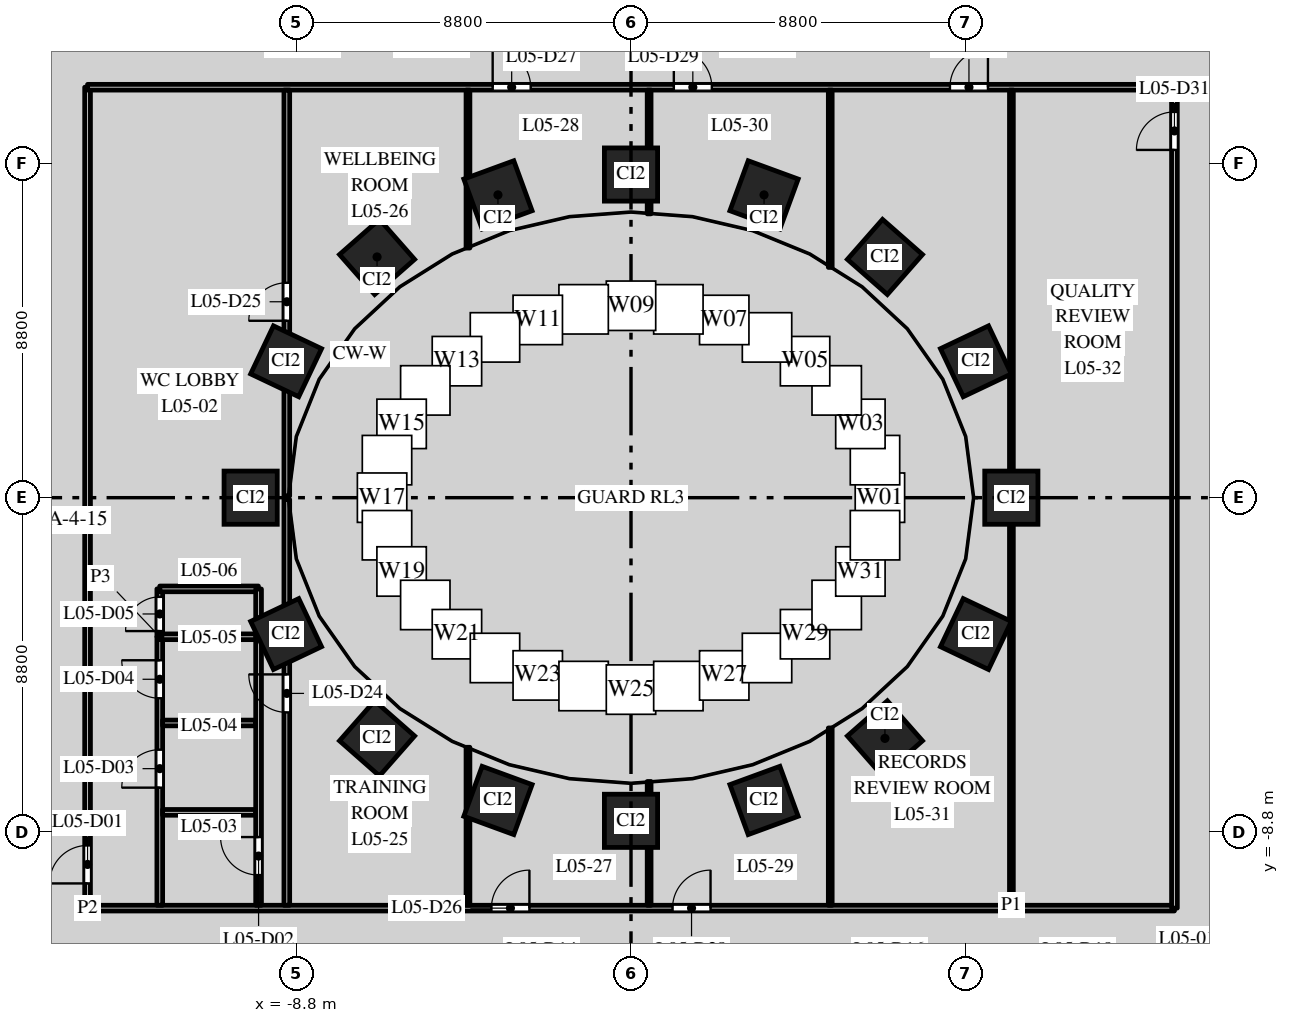
"""IFC4 building model, lengths in metres.
Left out: names, types, materials, properties, quantities, classifications, styles, units other than length and angle.
Written with IfcOpenShell. Run it as: python <this file> out.ifc"""

import sys

from ifc_helpers import new_model, si_unit, direction, frame, frame_2d, origin, origin_2d, place, context, subcontext, project, spatial, rectangle, extrude, element, fill, save


model = new_model("IFC4")
c1 = context("Model", 3, precision=1e-05, world=origin(), true_north=direction((0.0, 1.0)))
c2 = subcontext(c1, "Body", "Model", "MODEL_VIEW")
j1 = project(units=[si_unit("LENGTHUNIT", "METRE"), si_unit("PLANEANGLEUNIT", "RADIAN")], contexts=[c1])
p1 = place(None, origin())
s1 = spatial("IfcSite", under=j1, at=p1, CompositionType="ELEMENT")
p2 = place(p1, origin())
s2 = spatial("IfcBuilding", under=s1, at=p2, CompositionType="ELEMENT")
p3 = place(p2, frame((0.0, 0.0, 30.5)))
s3 = spatial("IfcBuildingStorey", under=s2, at=p3, CompositionType="ELEMENT", Elevation=30.5)
for number, where, z_axis, x_axis in (
    (1, (10.008, 0.0, 0.0), (0.0, 0.0, 1.0), (0.0, 1.0, 0.0)),
    (2, (9.076, 3.588, 0.0), (0.0, 0.0, 1.0), (-0.429, 0.903, 0.0)),
    (3, (6.682, 6.334, 0.0), (0.0, 0.0, 1.0), (-0.751, 0.66, 0.0)),
    (4, (3.501, 7.967, 0.0), (0.0, 0.0, 1.0), (-0.939, 0.344, 0.0)),
    (5, (0.0, 8.503, 0.0), (0.0, 0.0, 1.0), (-1.0, 0.0, 0.0)),
    (6, (-3.501, 7.967, 0.0), (0.0, 0.0, 1.0), (-0.939, -0.344, 0.0)),
    (7, (-6.682, 6.334, 0.0), (0.0, 0.0, 1.0), (-0.751, -0.66, 0.0)),
    (8, (-9.076, 3.588, 0.0), (0.0, 0.0, 1.0), (-0.429, -0.903, 0.0)),
    (9, (-10.008, 0.0, 0.0), (0.0, 0.0, 1.0), (0.0, -1.0, 0.0)),
    (10, (-9.076, -3.588, 0.0), (0.0, 0.0, 1.0), (0.429, -0.903, 0.0)),
    (11, (-6.682, -6.334, 0.0), (0.0, 0.0, 1.0), (0.751, -0.66, 0.0)),
    (12, (-3.501, -7.967, 0.0), (0.0, 0.0, 1.0), (0.939, -0.344, 0.0)),
    (13, (0.0, -8.503, 0.0), (0.0, 0.0, 1.0), (1.0, 0.0, 0.0)),
    (14, (3.501, -7.967, 0.0), (0.0, 0.0, 1.0), (0.939, 0.344, 0.0)),
    (15, (6.682, -6.334, 0.0), (0.0, 0.0, 1.0), (0.751, 0.66, 0.0)),
    (16, (9.076, -3.588, 0.0), (0.0, 0.0, 1.0), (0.429, 0.903, 0.0)),
):
    element("IfcColumn", number, at=place(p3, frame(where, z_axis=z_axis, x_axis=x_axis)), inside=s3, PredefinedType="COLUMN", context=c2, shape_type="SweptSolid", body=[
        extrude(rectangle(XDim=1.4, YDim=1.4, at=origin_2d()), origin(), (0.0, 0.0, 1.0), 4.0),
    ])
p4 = place(p3, frame((-14.3, -10.8, 0.0), z_axis=(0.0, 0.0, 1.0), x_axis=(0.0, 1.0, 0.0)))
e17 = element("IfcWall", 17, at=p4, inside=s3, PredefinedType="PARTITIONING", context=c2, shape_type="SweptSolid", body=[
    extrude(rectangle(XDim=21.6, YDim=0.15, at=frame_2d((10.8, 0.0))), origin(), (0.0, 0.0, 1.0), 2.75),
])
p5 = place(p4, frame((0.65, 0.0, 0.0)))
e18 = element("IfcOpeningElement", 18, at=p5, cuts=e17, PredefinedType="OPENING", context=c2, shape_type="SweptSolid", body=[
    extrude(rectangle(XDim=1.0, YDim=2.1, at=frame_2d((0.5, 1.05))), frame((0.0, 0.085, 0.0), z_axis=(0.0, -1.0, 0.0), x_axis=(1.0, 0.0, 0.0)), (0.0, 0.0, 1.0), 0.17),
])
p6 = place(p3, frame((-14.3, -10.8, 0.0), z_axis=(0.0, 0.0, 1.0), x_axis=(1.0, 0.0, 0.0)))
e19 = element("IfcWall", 19, at=p6, inside=s3, PredefinedType="PARTITIONING", context=c2, shape_type="SweptSolid", body=[
    extrude(rectangle(XDim=28.6, YDim=0.15, at=frame_2d((14.3, 0.0))), origin(), (0.0, 0.0, 1.0), 2.85),
])
p7 = place(p6, frame((10.627, 0.0, 0.0)))
e20 = element("IfcOpeningElement", 20, at=p7, cuts=e19, PredefinedType="OPENING", context=c2, shape_type="SweptSolid", body=[
    extrude(rectangle(XDim=1.0, YDim=2.1, at=frame_2d((0.5, 1.05))), frame((0.0, 0.085, 0.0), z_axis=(0.0, -1.0, 0.0), x_axis=(1.0, 0.0, 0.0)), (0.0, 0.0, 1.0), 0.17),
])
p8 = place(p6, frame((15.393, 0.0, 0.0)))
e21 = element("IfcOpeningElement", 21, at=p8, cuts=e19, PredefinedType="OPENING", context=c2, shape_type="SweptSolid", body=[
    extrude(rectangle(XDim=1.0, YDim=2.1, at=frame_2d((0.5, 1.05))), frame((0.0, 0.085, 0.0), z_axis=(0.0, -1.0, 0.0), x_axis=(1.0, 0.0, 0.0)), (0.0, 0.0, 1.0), 0.17),
])
p9 = place(p3, frame((-14.3, 10.8, 0.0), z_axis=(0.0, 0.0, 1.0), x_axis=(1.0, 0.0, 0.0)))
e22 = element("IfcWall", 22, at=p9, inside=s3, PredefinedType="PARTITIONING", context=c2, shape_type="SweptSolid", body=[
    extrude(rectangle(XDim=28.6, YDim=0.15, at=frame_2d((14.3, 0.0))), origin(), (0.0, 0.0, 1.0), 2.85),
])
p10 = place(p9, frame((10.66, 0.0, 0.0)))
e23 = element("IfcOpeningElement", 23, at=p10, cuts=e22, PredefinedType="OPENING", context=c2, shape_type="SweptSolid", body=[
    extrude(rectangle(XDim=1.0, YDim=2.1, at=frame_2d((0.5, 1.05))), frame((0.0, 0.085, 0.0), z_axis=(0.0, -1.0, 0.0), x_axis=(1.0, 0.0, 0.0)), (0.0, 0.0, 1.0), 0.17),
])
p11 = place(p9, frame((15.427, 0.0, 0.0)))
e24 = element("IfcOpeningElement", 24, at=p11, cuts=e22, PredefinedType="OPENING", context=c2, shape_type="SweptSolid", body=[
    extrude(rectangle(XDim=1.0, YDim=2.1, at=frame_2d((0.5, 1.05))), frame((0.0, 0.085, 0.0), z_axis=(0.0, -1.0, 0.0), x_axis=(1.0, 0.0, 0.0)), (0.0, 0.0, 1.0), 0.17),
])
p12 = place(p9, frame((22.693, 0.0, 0.0)))
e25 = element("IfcOpeningElement", 25, at=p12, cuts=e22, PredefinedType="OPENING", context=c2, shape_type="SweptSolid", body=[
    extrude(rectangle(XDim=1.0, YDim=2.1, at=frame_2d((0.5, 1.05))), frame((0.0, 0.085, 0.0), z_axis=(0.0, -1.0, 0.0), x_axis=(1.0, 0.0, 0.0)), (0.0, 0.0, 1.0), 0.17),
])
p13 = place(p3, frame((-12.4, -10.725, 0.0), z_axis=(0.0, 0.0, 1.0), x_axis=(0.0, 1.0, 0.0)))
e26 = element("IfcWall", 26, at=p13, inside=s3, PredefinedType="PARTITIONING", context=c2, shape_type="SweptSolid", body=[
    extrude(rectangle(XDim=7.065, YDim=0.15, at=frame_2d((3.533, 0.0))), origin(), (0.0, 0.0, 1.0), 2.75),
])
p14 = place(p13, frame((3.095, 0.0, 0.0)))
e27 = element("IfcOpeningElement", 27, at=p14, cuts=e26, PredefinedType="OPENING", context=c2, shape_type="SweptSolid", body=[
    extrude(rectangle(XDim=1.0, YDim=2.1, at=frame_2d((0.5, 1.05))), frame((0.0, 0.085, 0.0), z_axis=(0.0, -1.0, 0.0), x_axis=(1.0, 0.0, 0.0)), (0.0, 0.0, 1.0), 0.17),
])
p15 = place(p13, frame((5.447, 0.0, 0.0)))
e28 = element("IfcOpeningElement", 28, at=p15, cuts=e26, PredefinedType="OPENING", context=c2, shape_type="SweptSolid", body=[
    extrude(rectangle(XDim=1.0, YDim=2.1, at=frame_2d((0.5, 1.05))), frame((0.0, 0.085, 0.0), z_axis=(0.0, -1.0, 0.0), x_axis=(1.0, 0.0, 0.0)), (0.0, 0.0, 1.0), 0.17),
])
p16 = place(p3, frame((-12.325, -8.28, 0.0), z_axis=(0.0, 0.0, 1.0), x_axis=(1.0, 0.0, 0.0)))
e29 = element("IfcWall", 29, at=p16, inside=s3, PredefinedType="PARTITIONING", context=c2, shape_type="SweptSolid", body=[
    extrude(rectangle(XDim=2.45, YDim=0.15, at=frame_2d((1.225, 0.0))), origin(), (0.0, 0.0, 1.0), 2.75),
])
p17 = place(p3, frame((-12.325, -5.928, 0.0), z_axis=(0.0, 0.0, 1.0), x_axis=(1.0, 0.0, 0.0)))
e30 = element("IfcWall", 30, at=p17, inside=s3, PredefinedType="PARTITIONING", context=c2, shape_type="SweptSolid", body=[
    extrude(rectangle(XDim=2.45, YDim=0.15, at=frame_2d((1.225, 0.0))), origin(), (0.0, 0.0, 1.0), 3.7),
])
p18 = place(p3, frame((-12.4, -3.66, 0.0), z_axis=(0.0, 0.0, 1.0), x_axis=(0.0, 1.0, 0.0)))
e31 = element("IfcWall", 31, at=p18, inside=s3, PredefinedType="PARTITIONING", context=c2, shape_type="SweptSolid", body=[
    extrude(rectangle(XDim=1.26, YDim=0.15, at=frame_2d((0.63, 0.0))), origin(), (0.0, 0.0, 1.0), 3.7),
])
p19 = place(p18, frame((0.15, 0.0, 0.0)))
e32 = element("IfcOpeningElement", 32, at=p19, cuts=e31, PredefinedType="OPENING", context=c2, shape_type="SweptSolid", body=[
    extrude(rectangle(XDim=0.9, YDim=2.1, at=frame_2d((0.45, 1.05))), frame((0.0, 0.085, 0.0), z_axis=(0.0, -1.0, 0.0), x_axis=(1.0, 0.0, 0.0)), (0.0, 0.0, 1.0), 0.17),
])
p20 = place(p3, frame((-12.4, -3.66, 0.0), z_axis=(0.0, 0.0, 1.0), x_axis=(1.0, 0.0, 0.0)))
e33 = element("IfcWall", 33, at=p20, inside=s3, PredefinedType="PARTITIONING", context=c2, shape_type="SweptSolid", body=[
    extrude(rectangle(XDim=2.6, YDim=0.15, at=frame_2d((1.3, 0.0))), origin(), (0.0, 0.0, 1.0), 3.7),
])
p21 = place(p3, frame((-12.4, -2.4, 0.0), z_axis=(0.0, 0.0, 1.0), x_axis=(1.0, 0.0, 0.0)))
e34 = element("IfcWall", 34, at=p21, inside=s3, PredefinedType="PARTITIONING", context=c2, shape_type="SweptSolid", body=[
    extrude(rectangle(XDim=2.596, YDim=0.15, at=frame_2d((1.298, 0.0))), origin(), (0.0, 0.0, 1.0), 3.7),
])
p22 = place(p3, frame((-9.8, -10.725, 0.0), z_axis=(0.0, 0.0, 1.0), x_axis=(0.0, 1.0, 0.0)))
e35 = element("IfcWall", 35, at=p22, inside=s3, PredefinedType="PARTITIONING", context=c2, shape_type="SweptSolid", body=[
    extrude(rectangle(XDim=7.065, YDim=0.15, at=frame_2d((3.533, 0.0))), origin(), (0.0, 0.0, 1.0), 2.75),
])
p23 = place(p22, frame((0.795, 0.0, 0.0)))
e36 = element("IfcOpeningElement", 36, at=p23, cuts=e35, PredefinedType="OPENING", context=c2, shape_type="SweptSolid", body=[
    extrude(rectangle(XDim=1.0, YDim=2.1, at=frame_2d((0.5, 1.05))), frame((0.0, 0.085, 0.0), z_axis=(0.0, -1.0, 0.0), x_axis=(1.0, 0.0, 0.0)), (0.0, 0.0, 1.0), 0.17),
])
p24 = place(p3, frame((-9.8, -3.66, 0.0), z_axis=(0.0, 0.0, 1.0), x_axis=(0.0, 1.0, 0.0)))
e37 = element("IfcWall", 37, at=p24, inside=s3, PredefinedType="PARTITIONING", context=c2, shape_type="SweptSolid", body=[
    extrude(rectangle(XDim=1.256, YDim=0.15, at=frame_2d((0.628, 0.0))), origin(), (0.0, 0.0, 1.0), 3.7),
])
p25 = place(p3, frame((-9.057, -10.725, 0.0), z_axis=(0.0, 0.0, 1.0), x_axis=(0.0, 1.0, 0.0)))
e38 = element("IfcWall", 38, at=p25, inside=s3, PredefinedType="PARTITIONING", context=c2, shape_type="SweptSolid", body=[
    extrude(rectangle(XDim=10.68, YDim=0.15, at=frame_2d((5.34, 0.0))), origin(), (0.0, 0.0, 1.0), 2.75),
])
p26 = place(p25, frame((5.075, 0.0, 0.0)))
e39 = element("IfcOpeningElement", 39, at=p26, cuts=e38, PredefinedType="OPENING", context=c2, shape_type="SweptSolid", body=[
    extrude(rectangle(XDim=1.0, YDim=2.1, at=frame_2d((0.5, 1.05))), frame((0.0, 0.085, 0.0), z_axis=(0.0, -1.0, 0.0), x_axis=(1.0, 0.0, 0.0)), (0.0, 0.0, 1.0), 0.17),
])
p27 = place(p3, frame((-9.057, 0.045, 0.0), z_axis=(0.0, 0.0, 1.0), x_axis=(0.0, 1.0, 0.0)))
e40 = element("IfcWall", 40, at=p27, inside=s3, PredefinedType="PARTITIONING", context=c2, shape_type="SweptSolid", body=[
    extrude(rectangle(XDim=10.68, YDim=0.15, at=frame_2d((5.34, 0.0))), origin(), (0.0, 0.0, 1.0), 2.75),
])
p28 = place(p27, frame((4.61, 0.0, 0.0)))
e41 = element("IfcOpeningElement", 41, at=p28, cuts=e40, PredefinedType="OPENING", context=c2, shape_type="SweptSolid", body=[
    extrude(rectangle(XDim=1.0, YDim=2.1, at=frame_2d((0.5, 1.05))), frame((0.0, 0.085, 0.0), z_axis=(0.0, -1.0, 0.0), x_axis=(1.0, 0.0, 0.0)), (0.0, 0.0, 1.0), 0.17),
])
for number, where, z_axis, x_axis in (
    (42, (-4.29, -10.725, 0.0), (0.0, 0.0, 1.0), (0.0, 1.0, 0.0)),
    (43, (-4.29, 6.568, 0.0), (0.0, 0.0, 1.0), (0.0, 1.0, 0.0)),
):
    element("IfcWall", number, at=place(p3, frame(where, z_axis=z_axis, x_axis=x_axis)), inside=s3, PredefinedType="PARTITIONING", context=c2, shape_type="SweptSolid", body=[
        extrude(rectangle(XDim=4.157, YDim=0.1, at=frame_2d((2.079, 0.0))), origin(), (0.0, 0.0, 1.0), 2.85),
    ])
for number, where, z_axis, x_axis in (
    (44, (0.477, -10.725, 0.0), (0.0, 0.0, 1.0), (0.0, 1.0, 0.0)),
    (45, (0.477, 7.468, 0.0), (0.0, 0.0, 1.0), (0.0, 1.0, 0.0)),
):
    element("IfcWall", number, at=place(p3, frame(where, z_axis=z_axis, x_axis=x_axis)), inside=s3, PredefinedType="PARTITIONING", context=c2, shape_type="SweptSolid", body=[
        extrude(rectangle(XDim=3.257, YDim=0.1, at=frame_2d((1.628, 0.0))), origin(), (0.0, 0.0, 1.0), 2.85),
    ])
for number, where, z_axis, x_axis in (
    (46, (5.243, -10.725, 0.0), (0.0, 0.0, 1.0), (0.0, 1.0, 0.0)),
    (47, (5.243, 6.059, 0.0), (0.0, 0.0, 1.0), (0.0, 1.0, 0.0)),
):
    element("IfcWall", number, at=place(p3, frame(where, z_axis=z_axis, x_axis=x_axis)), inside=s3, PredefinedType="PARTITIONING", context=c2, shape_type="SweptSolid", body=[
        extrude(rectangle(XDim=4.666, YDim=0.1, at=frame_2d((2.333, 0.0))), origin(), (0.0, 0.0, 1.0), 2.85),
    ])
p29 = place(p3, frame((10.01, -10.725, 0.0), z_axis=(0.0, 0.0, 1.0), x_axis=(0.0, 1.0, 0.0)))
e48 = element("IfcWall", 48, at=p29, inside=s3, PredefinedType="PARTITIONING", context=c2, shape_type="SweptSolid", body=[
    extrude(rectangle(XDim=21.45, YDim=0.1, at=frame_2d((10.725, 0.0))), origin(), (0.0, 0.0, 1.0), 2.75),
])
p30 = place(p3, frame((14.3, -10.8, 0.0), z_axis=(0.0, 0.0, 1.0), x_axis=(0.0, 1.0, 0.0)))
e49 = element("IfcWall", 49, at=p30, inside=s3, PredefinedType="PARTITIONING", context=c2, shape_type="SweptSolid", body=[
    extrude(rectangle(XDim=21.6, YDim=0.15, at=frame_2d((10.8, 0.0))), origin(), (0.0, 0.0, 1.0), 2.75),
])
p31 = place(p30, frame((19.95, 0.0, 0.0)))
e50 = element("IfcOpeningElement", 50, at=p31, cuts=e49, PredefinedType="OPENING", context=c2, shape_type="SweptSolid", body=[
    extrude(rectangle(XDim=1.0, YDim=2.1, at=frame_2d((0.5, 1.05))), frame((0.0, 0.085, 0.0), z_axis=(0.0, -1.0, 0.0), x_axis=(1.0, 0.0, 0.0)), (0.0, 0.0, 1.0), 0.17),
])
p32 = place(p5, origin())
e51 = element("IfcDoor", 51, at=p32, inside=s3, OperationType="SINGLE_SWING_LEFT", PredefinedType="DOOR", context=c2, shape_type="SweptSolid", body=[
    extrude(rectangle(XDim=1.0, YDim=2.1, at=frame_2d((0.5, 1.05))), frame((0.0, 0.025, 0.0), z_axis=(0.0, -1.0, 0.0), x_axis=(1.0, 0.0, 0.0)), (0.0, 0.0, 1.0), 0.05),
])
fill(e18, e51)
p33 = place(p23, origin())
e52 = element("IfcDoor", 52, at=p33, inside=s3, OperationType="SINGLE_SWING_RIGHT", PredefinedType="DOOR", context=c2, shape_type="SweptSolid", body=[
    extrude(rectangle(XDim=1.0, YDim=2.1, at=frame_2d((0.5, 1.05))), frame((0.0, 0.025, 0.0), z_axis=(0.0, -1.0, 0.0), x_axis=(1.0, 0.0, 0.0)), (0.0, 0.0, 1.0), 0.05),
])
fill(e36, e52)
p34 = place(p14, origin())
e53 = element("IfcDoor", 53, at=p34, inside=s3, OperationType="SINGLE_SWING_LEFT", PredefinedType="DOOR", context=c2, shape_type="SweptSolid", body=[
    extrude(rectangle(XDim=1.0, YDim=2.1, at=frame_2d((0.5, 1.05))), frame((0.0, 0.025, 0.0), z_axis=(0.0, -1.0, 0.0), x_axis=(1.0, 0.0, 0.0)), (0.0, 0.0, 1.0), 0.05),
])
fill(e27, e53)
p35 = place(p15, origin())
e54 = element("IfcDoor", 54, at=p35, inside=s3, OperationType="SINGLE_SWING_RIGHT", PredefinedType="DOOR", context=c2, shape_type="SweptSolid", body=[
    extrude(rectangle(XDim=1.0, YDim=2.1, at=frame_2d((0.5, 1.05))), frame((0.0, 0.025, 0.0), z_axis=(0.0, -1.0, 0.0), x_axis=(1.0, 0.0, 0.0)), (0.0, 0.0, 1.0), 0.05),
])
fill(e28, e54)
p36 = place(p19, origin())
e55 = element("IfcDoor", 55, at=p36, inside=s3, OperationType="SINGLE_SWING_LEFT", PredefinedType="DOOR", context=c2, shape_type="SweptSolid", body=[
    extrude(rectangle(XDim=0.9, YDim=2.1, at=frame_2d((0.45, 1.05))), frame((0.0, 0.025, 0.0), z_axis=(0.0, -1.0, 0.0), x_axis=(1.0, 0.0, 0.0)), (0.0, 0.0, 1.0), 0.05),
])
fill(e32, e55)
p37 = place(p26, origin())
e56 = element("IfcDoor", 56, at=p37, inside=s3, OperationType="SINGLE_SWING_RIGHT", PredefinedType="DOOR", context=c2, shape_type="SweptSolid", body=[
    extrude(rectangle(XDim=1.0, YDim=2.1, at=frame_2d((0.5, 1.05))), frame((0.0, 0.025, 0.0), z_axis=(0.0, -1.0, 0.0), x_axis=(1.0, 0.0, 0.0)), (0.0, 0.0, 1.0), 0.05),
])
fill(e39, e56)
p38 = place(p28, origin())
e57 = element("IfcDoor", 57, at=p38, inside=s3, OperationType="SINGLE_SWING_LEFT", PredefinedType="DOOR", context=c2, shape_type="SweptSolid", body=[
    extrude(rectangle(XDim=1.0, YDim=2.1, at=frame_2d((0.5, 1.05))), frame((0.0, 0.025, 0.0), z_axis=(0.0, -1.0, 0.0), x_axis=(1.0, 0.0, 0.0)), (0.0, 0.0, 1.0), 0.05),
])
fill(e41, e57)
p39 = place(p7, origin())
e58 = element("IfcDoor", 58, at=p39, inside=s3, OperationType="SINGLE_SWING_RIGHT", PredefinedType="DOOR", context=c2, shape_type="SweptSolid", body=[
    extrude(rectangle(XDim=1.0, YDim=2.1, at=frame_2d((0.5, 1.05))), frame((0.0, 0.025, 0.0), z_axis=(0.0, -1.0, 0.0), x_axis=(1.0, 0.0, 0.0)), (0.0, 0.0, 1.0), 0.05),
])
fill(e20, e58)
p40 = place(p10, origin())
e59 = element("IfcDoor", 59, at=p40, inside=s3, OperationType="SINGLE_SWING_LEFT", PredefinedType="DOOR", context=c2, shape_type="SweptSolid", body=[
    extrude(rectangle(XDim=1.0, YDim=2.1, at=frame_2d((0.5, 1.05))), frame((0.0, 0.025, 0.0), z_axis=(0.0, -1.0, 0.0), x_axis=(1.0, 0.0, 0.0)), (0.0, 0.0, 1.0), 0.05),
])
fill(e23, e59)
p41 = place(p8, origin())
e60 = element("IfcDoor", 60, at=p41, inside=s3, OperationType="SINGLE_SWING_RIGHT", PredefinedType="DOOR", context=c2, shape_type="SweptSolid", body=[
    extrude(rectangle(XDim=1.0, YDim=2.1, at=frame_2d((0.5, 1.05))), frame((0.0, 0.025, 0.0), z_axis=(0.0, -1.0, 0.0), x_axis=(1.0, 0.0, 0.0)), (0.0, 0.0, 1.0), 0.05),
])
fill(e21, e60)
p42 = place(p11, origin())
e61 = element("IfcDoor", 61, at=p42, inside=s3, OperationType="SINGLE_SWING_LEFT", PredefinedType="DOOR", context=c2, shape_type="SweptSolid", body=[
    extrude(rectangle(XDim=1.0, YDim=2.1, at=frame_2d((0.5, 1.05))), frame((0.0, 0.025, 0.0), z_axis=(0.0, -1.0, 0.0), x_axis=(1.0, 0.0, 0.0)), (0.0, 0.0, 1.0), 0.05),
])
fill(e24, e61)
p43 = place(p12, origin())
e62 = element("IfcDoor", 62, at=p43, inside=s3, OperationType="SINGLE_SWING_RIGHT", PredefinedType="DOOR", context=c2, shape_type="SweptSolid", body=[
    extrude(rectangle(XDim=1.0, YDim=2.1, at=frame_2d((0.5, 1.05))), frame((0.0, 0.025, 0.0), z_axis=(0.0, -1.0, 0.0), x_axis=(1.0, 0.0, 0.0)), (0.0, 0.0, 1.0), 0.05),
])
fill(e25, e62)
p44 = place(p31, origin())
e63 = element("IfcDoor", 63, at=p44, inside=s3, OperationType="SINGLE_SWING_LEFT", PredefinedType="DOOR", context=c2, shape_type="SweptSolid", body=[
    extrude(rectangle(XDim=1.0, YDim=2.1, at=frame_2d((0.5, 1.05))), frame((0.0, 0.025, 0.0), z_axis=(0.0, -1.0, 0.0), x_axis=(1.0, 0.0, 0.0)), (0.0, 0.0, 1.0), 0.05),
])
fill(e50, e63)
save(model, sys.argv[1])
